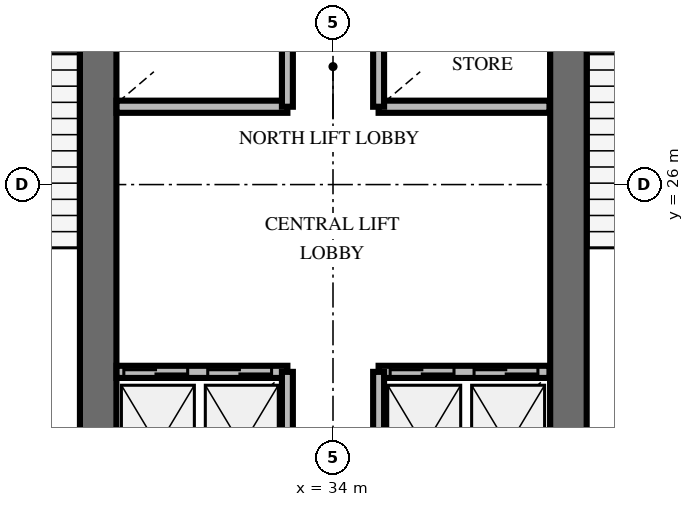
"""IFC4 building model, lengths in metres.
Left out: names, types, materials, properties, quantities, classifications, styles, units other than length and angle.
Written with IfcOpenShell. Run it as: python <this file> out.ifc"""

import sys

from ifc_helpers import new_model, si_unit, direction, frame, frame_2d, origin, place, context, subcontext, project, spatial, rectangle, extrude, element, fill, save


model = new_model("IFC4")
c1 = context("Model", 3, precision=1e-05, world=origin(), true_north=direction((0.0, 1.0)))
c2 = subcontext(c1, "Body", "Model", "MODEL_VIEW")
j1 = project(units=[si_unit("LENGTHUNIT", "METRE"), si_unit("PLANEANGLEUNIT", "RADIAN")], contexts=[c1])
p1 = place(None, origin())
s1 = spatial("IfcSite", under=j1, at=p1, CompositionType="ELEMENT")
p2 = place(p1, origin())
s2 = spatial("IfcBuilding", under=s1, at=p2, CompositionType="ELEMENT")
p3 = place(p2, frame((0.0, 0.0, 145.8)))
s3 = spatial("IfcBuildingStorey", under=s2, at=p3, CompositionType="ELEMENT", Elevation=145.8)
for number, where, z_axis, x_axis in (
    (1, (30.138, 20.187, 0.0), (0.0, 0.0, 1.0), (0.0, 1.0, 0.0)),
    (2, (37.872, 20.187, 0.0), (0.0, 0.0, 1.0), (0.0, 1.0, 0.0)),
):
    element("IfcWall", number, at=place(p3, frame(where, z_axis=z_axis, x_axis=x_axis)), inside=s3, PredefinedType="SHEAR", context=c2, shape_type="SweptSolid", body=[
        extrude(rectangle(XDim=9.826, YDim=0.6, at=frame_2d((4.913, 0.0))), origin(), (0.0, 0.0, 1.0), 4.0),
    ])
p4 = place(p3, frame((30.44, 22.92, 0.0), z_axis=(0.0, 0.0, 1.0), x_axis=(1.0, 0.0, 0.0)))
e3 = element("IfcWall", 3, at=p4, inside=s3, PredefinedType="SOLIDWALL", context=c2, shape_type="SweptSolid", body=[
    extrude(rectangle(XDim=2.81, YDim=0.2, at=frame_2d((1.405, 0.0))), origin(), (0.0, 0.0, 1.0), 2.8),
])
p5 = place(p4, frame((0.12, 0.0, 0.0)))
e4 = element("IfcOpeningElement", 4, at=p5, cuts=e3, PredefinedType="OPENING", context=c2, shape_type="SweptSolid", body=[
    extrude(rectangle(XDim=1.05, YDim=2.1, at=frame_2d((0.525, 1.05))), frame((0.0, 0.11, 0.0), z_axis=(0.0, -1.0, 0.0), x_axis=(1.0, 0.0, 0.0)), (0.0, 0.0, 1.0), 0.22),
])
p6 = place(p4, frame((1.5, 0.0, 0.0)))
e5 = element("IfcOpeningElement", 5, at=p6, cuts=e3, PredefinedType="OPENING", context=c2, shape_type="SweptSolid", body=[
    extrude(rectangle(XDim=1.05, YDim=2.1, at=frame_2d((0.525, 1.05))), frame((0.0, 0.11, 0.0), z_axis=(0.0, -1.0, 0.0), x_axis=(1.0, 0.0, 0.0)), (0.0, 0.0, 1.0), 0.22),
])
p7 = place(p3, frame((33.25, 20.5, 0.0), z_axis=(0.0, 0.0, 1.0), x_axis=(0.0, 1.0, 0.0)))
e6 = element("IfcWall", 6, at=p7, inside=s3, PredefinedType="SOLIDWALL", context=c2, shape_type="SweptSolid", body=[
    extrude(rectangle(XDim=2.42, YDim=0.18, at=frame_2d((1.21, 0.0))), origin(), (0.0, 0.0, 1.0), 2.8),
])
p8 = place(p3, frame((34.75, 22.92, 0.0), z_axis=(0.0, 0.0, 1.0), x_axis=(1.0, 0.0, 0.0)))
e7 = element("IfcWall", 7, at=p8, inside=s3, PredefinedType="SOLIDWALL", context=c2, shape_type="SweptSolid", body=[
    extrude(rectangle(XDim=2.81, YDim=0.2, at=frame_2d((1.405, 0.0))), origin(), (0.0, 0.0, 1.0), 2.8),
])
p9 = place(p8, frame((0.19, 0.0, 0.0)))
e8 = element("IfcOpeningElement", 8, at=p9, cuts=e7, PredefinedType="OPENING", context=c2, shape_type="SweptSolid", body=[
    extrude(rectangle(XDim=1.05, YDim=2.1, at=frame_2d((0.525, 1.05))), frame((0.0, 0.11, 0.0), z_axis=(0.0, -1.0, 0.0), x_axis=(1.0, 0.0, 0.0)), (0.0, 0.0, 1.0), 0.22),
])
p10 = place(p8, frame((1.57, 0.0, 0.0)))
e9 = element("IfcOpeningElement", 9, at=p10, cuts=e7, PredefinedType="OPENING", context=c2, shape_type="SweptSolid", body=[
    extrude(rectangle(XDim=1.05, YDim=2.1, at=frame_2d((0.525, 1.05))), frame((0.0, 0.11, 0.0), z_axis=(0.0, -1.0, 0.0), x_axis=(1.0, 0.0, 0.0)), (0.0, 0.0, 1.0), 0.22),
])
p11 = place(p3, frame((34.75, 20.5, 0.0), z_axis=(0.0, 0.0, 1.0), x_axis=(0.0, 1.0, 0.0)))
e10 = element("IfcWall", 10, at=p11, inside=s3, PredefinedType="SOLIDWALL", context=c2, shape_type="SweptSolid", body=[
    extrude(rectangle(XDim=2.42, YDim=0.18, at=frame_2d((1.21, 0.0))), origin(), (0.0, 0.0, 1.0), 2.8),
])
p12 = place(p3, frame((30.44, 27.28, 0.0), z_axis=(0.0, 0.0, 1.0), x_axis=(1.0, 0.0, 0.0)))
e11 = element("IfcWall", 11, at=p12, inside=s3, PredefinedType="SOLIDWALL", context=c2, shape_type="SweptSolid", body=[
    extrude(rectangle(XDim=2.81, YDim=0.2, at=frame_2d((1.405, 0.0))), origin(), (0.0, 0.0, 1.0), 2.8),
])
p13 = place(p3, frame((33.25, 27.28, 0.0), z_axis=(0.0, 0.0, 1.0), x_axis=(0.0, 1.0, 0.0)))
e12 = element("IfcWall", 12, at=p13, inside=s3, PredefinedType="SOLIDWALL", context=c2, shape_type="SweptSolid", body=[
    extrude(rectangle(XDim=2.47, YDim=0.18, at=frame_2d((1.235, 0.0))), origin(), (0.0, 0.0, 1.0), 2.8),
])
p14 = place(p3, frame((34.75, 27.28, 0.0), z_axis=(0.0, 0.0, 1.0), x_axis=(1.0, 0.0, 0.0)))
e13 = element("IfcWall", 13, at=p14, inside=s3, PredefinedType="SOLIDWALL", context=c2, shape_type="SweptSolid", body=[
    extrude(rectangle(XDim=2.81, YDim=0.2, at=frame_2d((1.405, 0.0))), origin(), (0.0, 0.0, 1.0), 2.8),
])
p15 = place(p3, frame((34.75, 27.28, 0.0), z_axis=(0.0, 0.0, 1.0), x_axis=(0.0, 1.0, 0.0)))
e14 = element("IfcWall", 14, at=p15, inside=s3, PredefinedType="SOLIDWALL", context=c2, shape_type="SweptSolid", body=[
    extrude(rectangle(XDim=2.47, YDim=0.18, at=frame_2d((1.235, 0.0))), origin(), (0.0, 0.0, 1.0), 2.8),
])
p16 = place(p5, origin())
e15 = element("IfcDoor", 15, at=p16, inside=s3, OperationType="DOUBLE_DOOR_SLIDING", PredefinedType="USERDEFINED", context=c2, shape_type="SweptSolid", body=[
    extrude(rectangle(XDim=1.05, YDim=2.1, at=frame_2d((0.525, 1.05))), frame((0.0, 0.025, 0.0), z_axis=(0.0, -1.0, 0.0), x_axis=(1.0, 0.0, 0.0)), (0.0, 0.0, 1.0), 0.05),
])
fill(e4, e15)
p17 = place(p6, origin())
e16 = element("IfcDoor", 16, at=p17, inside=s3, OperationType="DOUBLE_DOOR_SLIDING", PredefinedType="USERDEFINED", context=c2, shape_type="SweptSolid", body=[
    extrude(rectangle(XDim=1.05, YDim=2.1, at=frame_2d((0.525, 1.05))), frame((0.0, 0.025, 0.0), z_axis=(0.0, -1.0, 0.0), x_axis=(1.0, 0.0, 0.0)), (0.0, 0.0, 1.0), 0.05),
])
fill(e5, e16)
p18 = place(p9, origin())
e17 = element("IfcDoor", 17, at=p18, inside=s3, OperationType="DOUBLE_DOOR_SLIDING", PredefinedType="USERDEFINED", context=c2, shape_type="SweptSolid", body=[
    extrude(rectangle(XDim=1.05, YDim=2.1, at=frame_2d((0.525, 1.05))), frame((0.0, 0.025, 0.0), z_axis=(0.0, -1.0, 0.0), x_axis=(1.0, 0.0, 0.0)), (0.0, 0.0, 1.0), 0.05),
])
fill(e8, e17)
p19 = place(p10, origin())
e18 = element("IfcDoor", 18, at=p19, inside=s3, OperationType="DOUBLE_DOOR_SLIDING", PredefinedType="USERDEFINED", context=c2, shape_type="SweptSolid", body=[
    extrude(rectangle(XDim=1.05, YDim=2.1, at=frame_2d((0.525, 1.05))), frame((0.0, 0.025, 0.0), z_axis=(0.0, -1.0, 0.0), x_axis=(1.0, 0.0, 0.0)), (0.0, 0.0, 1.0), 0.05),
])
fill(e9, e18)
save(model, sys.argv[1])
